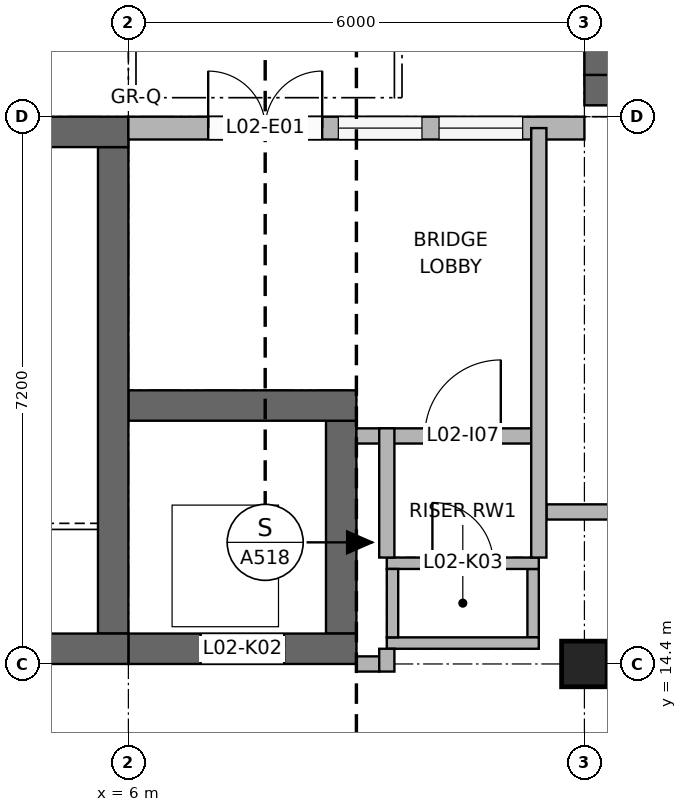
"""IFC4 building model, lengths in metres.
Left out: names, types, materials, properties, quantities, classifications, styles, units other than length and angle.
Written with IfcOpenShell. Run it as: python <this file> out.ifc"""

import sys

from ifc_helpers import new_model, si_unit, direction, frame, frame_2d, origin, origin_2d, place, context, subcontext, project, spatial, rectangle, extrude, element, fill, save


model = new_model("IFC4")
c1 = context("Model", 3, precision=1e-05, world=origin(), true_north=direction((0.0, 1.0)))
c2 = subcontext(c1, "Body", "Model", "MODEL_VIEW")
j1 = project(units=[si_unit("LENGTHUNIT", "METRE"), si_unit("PLANEANGLEUNIT", "RADIAN")], contexts=[c1])
p1 = place(None, origin())
s1 = spatial("IfcSite", under=j1, at=p1, CompositionType="ELEMENT")
p2 = place(p1, origin())
s2 = spatial("IfcBuilding", under=s1, at=p2, CompositionType="ELEMENT")
p3 = place(p2, frame((0.0, 0.0, 8.4)))
s3 = spatial("IfcBuildingStorey", under=s2, at=p3, CompositionType="ELEMENT", Elevation=8.4)
p4 = place(p3, frame((0.0, 14.6, 0.0), z_axis=(0.0, 0.0, 1.0), x_axis=(1.0, 0.0, 0.0)))
e1 = element("IfcWall", 1, at=p4, inside=s3, PredefinedType="SHEAR", context=c2, shape_type="SweptSolid", body=[
    extrude(rectangle(XDim=6.0, YDim=0.4, at=frame_2d((3.0, 0.0))), origin(), (0.0, 0.0, 1.0), 3.95),
])
p5 = place(p4, frame((2.4, 0.0, 0.0)))
e2 = element("IfcOpeningElement", 2, at=p5, cuts=e1, PredefinedType="OPENING", context=c2, shape_type="SweptSolid", body=[
    extrude(rectangle(XDim=1.2, YDim=2.1, at=frame_2d((0.6, 1.05))), frame((0.0, 0.21, 0.0), z_axis=(0.0, -1.0, 0.0), x_axis=(1.0, 0.0, 0.0)), (0.0, 0.0, 1.0), 0.42),
])
p6 = place(p3, frame((0.0, 21.4, 0.0), z_axis=(0.0, 0.0, 1.0), x_axis=(1.0, 0.0, 0.0)))
e3 = element("IfcWall", 3, at=p6, inside=s3, PredefinedType="SHEAR", context=c2, shape_type="SweptSolid", body=[
    extrude(rectangle(XDim=6.0, YDim=0.4, at=frame_2d((3.0, 0.0))), origin(), (0.0, 0.0, 1.0), 3.95),
])
p7 = place(p3, frame((5.8, 14.8, 0.0), z_axis=(0.0, 0.0, 1.0), x_axis=(0.0, 1.0, 0.0)))
e4 = element("IfcWall", 4, at=p7, inside=s3, PredefinedType="SHEAR", context=c2, shape_type="SweptSolid", body=[
    extrude(rectangle(XDim=6.4, YDim=0.4, at=frame_2d((3.2, 0.0))), origin(), (0.0, 0.0, 1.0), 3.95),
])
p8 = place(p3, frame((6.0, 14.6, 0.0), z_axis=(0.0, 0.0, 1.0), x_axis=(1.0, 0.0, 0.0)))
e5 = element("IfcWall", 5, at=p8, inside=s3, PredefinedType="SHEAR", context=c2, shape_type="SweptSolid", body=[
    extrude(rectangle(XDim=3.0, YDim=0.4, at=frame_2d((1.5, 0.0))), origin(), (0.0, 0.0, 1.0), 5.75),
])
p9 = place(p8, frame((0.95, 0.0, 0.0)))
e6 = element("IfcOpeningElement", 6, at=p9, cuts=e5, PredefinedType="OPENING", context=c2, shape_type="SweptSolid", body=[
    extrude(rectangle(XDim=1.1, YDim=2.1, at=frame_2d((0.55, 1.05))), frame((0.0, 0.21, 0.0), z_axis=(0.0, -1.0, 0.0), x_axis=(1.0, 0.0, 0.0)), (0.0, 0.0, 1.0), 0.42),
])
p10 = place(p3, frame((6.0, 17.8, 0.0), z_axis=(0.0, 0.0, 1.0), x_axis=(1.0, 0.0, 0.0)))
e7 = element("IfcWall", 7, at=p10, inside=s3, PredefinedType="SHEAR", context=c2, shape_type="SweptSolid", body=[
    extrude(rectangle(XDim=3.0, YDim=0.4, at=frame_2d((1.5, 0.0))), origin(), (0.0, 0.0, 1.0), 5.75),
])
p11 = place(p3, frame((8.8, 14.8, 0.0), z_axis=(0.0, 0.0, 1.0), x_axis=(0.0, 1.0, 0.0)))
e8 = element("IfcWall", 8, at=p11, inside=s3, PredefinedType="SHEAR", context=c2, shape_type="SweptSolid", body=[
    extrude(rectangle(XDim=2.8, YDim=0.4, at=frame_2d((1.4, 0.0))), origin(), (0.0, 0.0, 1.0), 5.75),
])
p12 = place(p3, frame((12.0, 21.95, 0.0), z_axis=(0.0, 0.0, 1.0), x_axis=(1.0, 0.0, 0.0)))
e9 = element("IfcWall", 9, at=p12, inside=s3, PredefinedType="SHEAR", context=c2, shape_type="SweptSolid", body=[
    extrude(rectangle(XDim=6.0, YDim=0.4, at=frame_2d((3.0, 0.0))), origin(), (0.0, 0.0, 1.0), 3.78),
])
p13 = place(p3, frame((12.2, 22.15, 0.0), z_axis=(0.0, 0.0, 1.0), x_axis=(0.0, 1.0, 0.0)))
e10 = element("IfcWall", 10, at=p13, inside=s3, PredefinedType="SHEAR", context=c2, shape_type="SweptSolid", body=[
    extrude(rectangle(XDim=6.25, YDim=0.4, at=frame_2d((3.125, 0.0))), origin(), (0.0, 0.0, 1.0), 3.78),
])
p14 = place(p3, frame((9.4, 14.675, 0.0), z_axis=(0.0, 0.0, 1.0), x_axis=(1.0, 0.0, 0.0)))
e11 = element("IfcWall", 11, at=p14, inside=s3, PredefinedType="SOLIDWALL", context=c2, shape_type="SweptSolid", body=[
    extrude(rectangle(XDim=2.0, YDim=0.15, at=frame_2d((1.0, 0.0))), origin(), (0.0, 0.0, 1.0), 3.95),
])
p15 = place(p3, frame((9.4, 15.725, 0.0), z_axis=(0.0, 0.0, 1.0), x_axis=(1.0, 0.0, 0.0)))
e12 = element("IfcWall", 12, at=p15, inside=s3, PredefinedType="SOLIDWALL", context=c2, shape_type="SweptSolid", body=[
    extrude(rectangle(XDim=2.0, YDim=0.15, at=frame_2d((1.0, 0.0))), origin(), (0.0, 0.0, 1.0), 3.95),
])
p16 = place(p15, frame((0.6, 0.0, 0.0)))
e13 = element("IfcOpeningElement", 13, at=p16, cuts=e12, PredefinedType="OPENING", context=c2, shape_type="SweptSolid", body=[
    extrude(rectangle(XDim=0.8, YDim=2.1, at=frame_2d((0.4, 1.05))), frame((0.0, 0.085, 0.0), z_axis=(0.0, -1.0, 0.0), x_axis=(1.0, 0.0, 0.0)), (0.0, 0.0, 1.0), 0.17),
])
for number, where, z_axis, x_axis in (
    (14, (9.475, 14.75, 0.0), (0.0, 0.0, 1.0), (0.0, 1.0, 0.0)),
    (15, (11.325, 14.75, 0.0), (0.0, 0.0, 1.0), (0.0, 1.0, 0.0)),
):
    element("IfcWall", number, at=place(p3, frame(where, z_axis=z_axis, x_axis=x_axis)), inside=s3, PredefinedType="SOLIDWALL", context=c2, shape_type="SweptSolid", body=[
        extrude(rectangle(XDim=0.9, YDim=0.15, at=frame_2d((0.45, 0.0))), origin(), (0.0, 0.0, 1.0), 3.95),
    ])
p17 = place(p3, frame((12.0, 14.4, 0.0), z_axis=(0.0, 0.0, 1.0), x_axis=(1.0, 0.0, 0.0)))
e16 = element("IfcColumn", 16, at=p17, inside=s3, PredefinedType="COLUMN", context=c2, shape_type="SweptSolid", body=[
    extrude(rectangle(XDim=0.6, YDim=0.6, at=origin_2d()), origin(), (0.0, 0.0, 1.0), 3.95),
])
p18 = place(p3, frame((6.0, 21.45, 0.0), z_axis=(0.0, 0.0, 1.0), x_axis=(1.0, 0.0, 0.0)))
e17 = element("IfcWall", 17, at=p18, inside=s3, PredefinedType="SOLIDWALL", context=c2, shape_type="SweptSolid", body=[
    extrude(rectangle(XDim=6.0, YDim=0.3, at=frame_2d((3.0, 0.0))), origin(), (0.0, 0.0, 1.0), 3.95),
])
p19 = place(p18, frame((1.05, 0.0, 0.0)))
e18 = element("IfcOpeningElement", 18, at=p19, cuts=e17, PredefinedType="OPENING", context=c2, shape_type="SweptSolid", body=[
    extrude(rectangle(XDim=1.5, YDim=2.4, at=frame_2d((0.75, 1.2))), frame((0.0, 0.16, 0.0), z_axis=(0.0, -1.0, 0.0), x_axis=(1.0, 0.0, 0.0)), (0.0, 0.0, 1.0), 0.32),
])
p20 = place(p18, frame((2.762, 0.0, 0.9)))
e19 = element("IfcOpeningElement", 19, at=p20, cuts=e17, PredefinedType="OPENING", context=c2, shape_type="SweptSolid", body=[
    extrude(rectangle(XDim=1.1, YDim=1.5, at=frame_2d((0.55, 0.75))), frame((0.0, 0.16, 0.0), z_axis=(0.0, -1.0, 0.0), x_axis=(1.0, 0.0, 0.0)), (0.0, 0.0, 1.0), 0.32),
])
p21 = place(p18, frame((4.087, 0.0, 0.9)))
e20 = element("IfcOpeningElement", 20, at=p21, cuts=e17, PredefinedType="OPENING", context=c2, shape_type="SweptSolid", body=[
    extrude(rectangle(XDim=1.1, YDim=1.5, at=frame_2d((0.55, 0.75))), frame((0.0, 0.16, 0.0), z_axis=(0.0, -1.0, 0.0), x_axis=(1.0, 0.0, 0.0)), (0.0, 0.0, 1.0), 0.32),
])
p22 = place(p3, frame((9.4, 14.3, 0.0), z_axis=(0.0, 0.0, 1.0), x_axis=(0.0, 1.0, 0.0)))
e21 = element("IfcWall", 21, at=p22, inside=s3, PredefinedType="PARTITIONING", context=c2, shape_type="SweptSolid", body=[
    extrude(rectangle(XDim=0.3, YDim=0.2, at=frame_2d((0.15, 0.0))), origin(), (0.0, 0.0, 1.0), 3.25),
])
p23 = place(p3, frame((9.4, 15.8, 0.0), z_axis=(0.0, 0.0, 1.0), x_axis=(0.0, 1.0, 0.0)))
e22 = element("IfcWall", 22, at=p23, inside=s3, PredefinedType="PARTITIONING", context=c2, shape_type="SweptSolid", body=[
    extrude(rectangle(XDim=1.7, YDim=0.2, at=frame_2d((0.85, 0.0))), origin(), (0.0, 0.0, 1.0), 3.95),
])
p24 = place(p3, frame((11.4, 15.8, 0.0), z_axis=(0.0, 0.0, 1.0), x_axis=(0.0, 1.0, 0.0)))
e23 = element("IfcWall", 23, at=p24, inside=s3, PredefinedType="PARTITIONING", context=c2, shape_type="SweptSolid", body=[
    extrude(rectangle(XDim=5.65, YDim=0.2, at=frame_2d((2.825, 0.0))), origin(), (0.0, 0.0, 1.0), 3.95),
])
p25 = place(p3, frame((9.0, 14.4, 0.0), z_axis=(0.0, 0.0, 1.0), x_axis=(1.0, 0.0, 0.0)))
e24 = element("IfcWall", 24, at=p25, inside=s3, PredefinedType="PARTITIONING", context=c2, shape_type="SweptSolid", body=[
    extrude(rectangle(XDim=0.3, YDim=0.2, at=frame_2d((0.15, 0.0))), origin(), (0.0, 0.0, 1.0), 3.25),
])
p26 = place(p3, frame((11.5, 16.4, 0.0), z_axis=(0.0, 0.0, 1.0), x_axis=(1.0, 0.0, 0.0)))
e25 = element("IfcWall", 25, at=p26, inside=s3, PredefinedType="PARTITIONING", context=c2, shape_type="SweptSolid", body=[
    extrude(rectangle(XDim=5.35, YDim=0.2, at=frame_2d((2.675, 0.0))), origin(), (0.0, 0.0, 1.0), 3.05),
])
p27 = place(p26, frame((1.35, 0.0, 0.0)))
e26 = element("IfcOpeningElement", 26, at=p27, cuts=e25, PredefinedType="OPENING", context=c2, shape_type="SweptSolid", body=[
    extrude(rectangle(XDim=1.0, YDim=2.1, at=frame_2d((0.5, 1.05))), frame((0.0, 0.11, 0.0), z_axis=(0.0, -1.0, 0.0), x_axis=(1.0, 0.0, 0.0)), (0.0, 0.0, 1.0), 0.22),
])
p28 = place(p26, frame((4.075, 0.0, 0.0)))
e27 = element("IfcOpeningElement", 27, at=p28, cuts=e25, PredefinedType="OPENING", context=c2, shape_type="SweptSolid", body=[
    extrude(rectangle(XDim=0.9, YDim=2.1, at=frame_2d((0.45, 1.05))), frame((0.0, 0.11, 0.0), z_axis=(0.0, -1.0, 0.0), x_axis=(1.0, 0.0, 0.0)), (0.0, 0.0, 1.0), 0.22),
])
p29 = place(p3, frame((9.0, 17.4, 0.0), z_axis=(0.0, 0.0, 1.0), x_axis=(1.0, 0.0, 0.0)))
e28 = element("IfcWall", 28, at=p29, inside=s3, PredefinedType="PARTITIONING", context=c2, shape_type="SweptSolid", body=[
    extrude(rectangle(XDim=2.3, YDim=0.2, at=frame_2d((1.15, 0.0))), origin(), (0.0, 0.0, 1.0), 3.95),
])
p30 = place(p29, frame((0.9, 0.0, 0.0)))
e29 = element("IfcOpeningElement", 29, at=p30, cuts=e28, PredefinedType="OPENING", context=c2, shape_type="SweptSolid", body=[
    extrude(rectangle(XDim=1.0, YDim=2.1, at=frame_2d((0.5, 1.05))), frame((0.0, 0.11, 0.0), z_axis=(0.0, -1.0, 0.0), x_axis=(1.0, 0.0, 0.0)), (0.0, 0.0, 1.0), 0.22),
])
p31 = place(p19, origin())
e30 = element("IfcDoor", 30, at=p31, inside=s3, OperationType="DOUBLE_DOOR_SINGLE_SWING", PredefinedType="DOOR", context=c2, shape_type="SweptSolid", body=[
    extrude(rectangle(XDim=1.5, YDim=2.4, at=frame_2d((0.75, 1.2))), frame((0.0, 0.025, 0.0), z_axis=(0.0, -1.0, 0.0), x_axis=(1.0, 0.0, 0.0)), (0.0, 0.0, 1.0), 0.05),
])
fill(e18, e30)
p32 = place(p20, origin())
e31 = element("IfcWindow", 31, at=p32, inside=s3, PartitioningType="SINGLE_PANEL", PredefinedType="WINDOW", context=c2, shape_type="SweptSolid", body=[
    extrude(rectangle(XDim=1.1, YDim=1.5, at=frame_2d((0.55, 0.75))), frame((0.0, 0.03, 0.0), z_axis=(0.0, -1.0, 0.0), x_axis=(1.0, 0.0, 0.0)), (0.0, 0.0, 1.0), 0.06),
])
fill(e19, e31)
p33 = place(p21, origin())
e32 = element("IfcWindow", 32, at=p33, inside=s3, PartitioningType="SINGLE_PANEL", PredefinedType="WINDOW", context=c2, shape_type="SweptSolid", body=[
    extrude(rectangle(XDim=1.1, YDim=1.5, at=frame_2d((0.55, 0.75))), frame((0.0, 0.03, 0.0), z_axis=(0.0, -1.0, 0.0), x_axis=(1.0, 0.0, 0.0)), (0.0, 0.0, 1.0), 0.06),
])
fill(e20, e32)
p34 = place(p9, origin())
e33 = element("IfcDoor", 33, at=p34, inside=s3, OperationType="DOUBLE_DOOR_SLIDING", PredefinedType="DOOR", context=c2, shape_type="SweptSolid", body=[
    extrude(rectangle(XDim=1.1, YDim=2.1, at=frame_2d((0.55, 1.05))), frame((0.0, 0.025, 0.0), z_axis=(0.0, -1.0, 0.0), x_axis=(1.0, 0.0, 0.0)), (0.0, 0.0, 1.0), 0.05),
])
fill(e6, e33)
p35 = place(p16, origin())
e34 = element("IfcDoor", 34, at=p35, inside=s3, OperationType="SINGLE_SWING_LEFT", PredefinedType="DOOR", context=c2, shape_type="SweptSolid", body=[
    extrude(rectangle(XDim=0.8, YDim=2.1, at=frame_2d((0.4, 1.05))), frame((0.0, 0.025, 0.0), z_axis=(0.0, -1.0, 0.0), x_axis=(1.0, 0.0, 0.0)), (0.0, 0.0, 1.0), 0.05),
])
fill(e13, e34)
p36 = place(p30, origin())
e35 = element("IfcDoor", 35, at=p36, inside=s3, OperationType="SINGLE_SWING_RIGHT", PredefinedType="DOOR", context=c2, shape_type="SweptSolid", body=[
    extrude(rectangle(XDim=1.0, YDim=2.1, at=frame_2d((0.5, 1.05))), frame((0.0, 0.025, 0.0), z_axis=(0.0, -1.0, 0.0), x_axis=(1.0, 0.0, 0.0)), (0.0, 0.0, 1.0), 0.05),
])
fill(e29, e35)
save(model, sys.argv[1])
